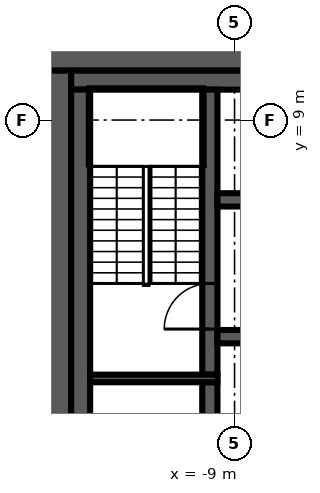
"""IFC4 building model, lengths in metres.
Left out: names, types, materials, properties, quantities, classifications, styles, units other than length and angle.
Written with IfcOpenShell. Run it as: python <this file> out.ifc"""

import sys

from ifc_helpers import new_model, si_unit, direction, frame, frame_2d, origin, place, context, subcontext, project, spatial, rectangle, extrude, element, fill, save


model = new_model("IFC4")
c1 = context("Model", 3, precision=1e-05, world=origin(), true_north=direction((0.0, 1.0)))
c2 = subcontext(c1, "Body", "Model", "MODEL_VIEW")
j1 = project(units=[si_unit("LENGTHUNIT", "METRE"), si_unit("PLANEANGLEUNIT", "RADIAN")], contexts=[c1])
p1 = place(None, origin())
s1 = spatial("IfcSite", under=j1, at=p1, CompositionType="ELEMENT")
p2 = place(p1, origin())
s2 = spatial("IfcBuilding", under=s1, at=p2, CompositionType="ELEMENT")
p3 = place(p2, frame((0.0, 0.0, 279.0)))
s3 = spatial("IfcBuildingStorey", under=s2, at=p3, CompositionType="ELEMENT", Elevation=279.0)
p4 = place(p3, frame((-14.0, 10.65, 0.0), z_axis=(0.0, 0.0, 1.0), x_axis=(1.0, 0.0, 0.0)))
e1 = element("IfcWall", 1, at=p4, inside=s3, PredefinedType="SHEAR", context=c2, shape_type="SweptSolid", body=[
    extrude(rectangle(XDim=28.0, YDim=0.7, at=frame_2d((14.0, 0.0))), origin(), (0.0, 0.0, 1.0), 3.6),
])
p5 = place(p4, frame((15.9, 0.0, 0.0)))
e2 = element("IfcOpeningElement", 2, at=p5, cuts=e1, PredefinedType="OPENING", context=c2, shape_type="SweptSolid", body=[
    extrude(rectangle(XDim=1.6, YDim=2.1, at=frame_2d((0.8, 1.05))), frame((0.0, 0.36, 0.0), z_axis=(0.0, -1.0, 0.0), x_axis=(1.0, 0.0, 0.0)), (0.0, 0.0, 1.0), 0.72),
])
p6 = place(p3, frame((-13.65, -10.3, 0.0), z_axis=(0.0, 0.0, 1.0), x_axis=(0.0, 1.0, 0.0)))
e3 = element("IfcWall", 3, at=p6, inside=s3, PredefinedType="SHEAR", context=c2, shape_type="SweptSolid", body=[
    extrude(rectangle(XDim=20.6, YDim=0.7, at=frame_2d((10.3, 0.0))), origin(), (0.0, 0.0, 1.0), 3.6),
])
p7 = place(p3, frame((-13.3, 10.05, 0.0), z_axis=(0.0, 0.0, 1.0), x_axis=(1.0, 0.0, 0.0)))
e4 = element("IfcWall", 4, at=p7, inside=s3, PredefinedType="SHEAR", context=c2, shape_type="SweptSolid", body=[
    extrude(rectangle(XDim=14.8, YDim=0.5, at=frame_2d((7.4, 0.0))), origin(), (0.0, 0.0, 1.0), 3.6),
])
p8 = place(p3, frame((-13.05, -9.8, 0.0), z_axis=(0.0, 0.0, 1.0), x_axis=(0.0, 1.0, 0.0)))
e5 = element("IfcWall", 5, at=p8, inside=s3, PredefinedType="SHEAR", context=c2, shape_type="SweptSolid", body=[
    extrude(rectangle(XDim=19.6, YDim=0.5, at=frame_2d((9.8, 0.0))), origin(), (0.0, 0.0, 1.0), 3.6),
])
p9 = place(p3, frame((-9.65, -2.1, 0.0), z_axis=(0.0, 0.0, 1.0), x_axis=(0.0, 1.0, 0.0)))
e6 = element("IfcWall", 6, at=p9, inside=s3, PredefinedType="SHEAR", context=c2, shape_type="SweptSolid", body=[
    extrude(rectangle(XDim=4.2, YDim=0.4, at=frame_2d((2.1, 0.0))), origin(), (0.0, 0.0, 1.0), 3.6),
])
p10 = place(p3, frame((-9.65, 2.3, 0.0), z_axis=(0.0, 0.0, 1.0), x_axis=(0.0, 1.0, 0.0)))
e7 = element("IfcWall", 7, at=p10, inside=s3, PredefinedType="SHEAR", context=c2, shape_type="SweptSolid", body=[
    extrude(rectangle(XDim=7.5, YDim=0.4, at=frame_2d((3.75, 0.0))), origin(), (0.0, 0.0, 1.0), 3.6),
])
p11 = place(p10, frame((1.2, 0.0, 0.0)))
e8 = element("IfcOpeningElement", 8, at=p11, cuts=e7, PredefinedType="OPENING", context=c2, shape_type="SweptSolid", body=[
    extrude(rectangle(XDim=1.2, YDim=2.1, at=frame_2d((0.6, 1.05))), frame((0.0, 0.21, 0.0), z_axis=(0.0, -1.0, 0.0), x_axis=(1.0, 0.0, 0.0)), (0.0, 0.0, 1.0), 0.42),
])
p12 = place(p3, frame((-9.45, 2.2, 0.0), z_axis=(0.0, 0.0, 1.0), x_axis=(-1.0, 0.0, 0.0)))
e9 = element("IfcWall", 9, at=p12, inside=s3, PredefinedType="SHEAR", context=c2, shape_type="SweptSolid", body=[
    extrude(rectangle(XDim=3.35, YDim=0.2, at=frame_2d((1.675, 0.0))), origin(), (0.0, 0.0, 1.0), 3.6),
])
p13 = place(p3, frame((-9.45, 6.9, 0.0), z_axis=(0.0, 0.0, 1.0), x_axis=(1.0, 0.0, 0.0)))
e10 = element("IfcWall", 10, at=p13, inside=s3, PredefinedType="SHEAR", context=c2, shape_type="SweptSolid", body=[
    extrude(rectangle(XDim=18.9, YDim=0.35, at=frame_2d((9.45, 0.0))), origin(), (0.0, 0.0, 1.0), 3.6),
])
p14 = place(p13, frame((11.55, 0.0, 0.0)))
e11 = element("IfcOpeningElement", 11, at=p14, cuts=e10, PredefinedType="OPENING", context=c2, shape_type="SweptSolid", body=[
    extrude(rectangle(XDim=1.2, YDim=2.1, at=frame_2d((0.6, 1.05))), frame((0.0, 0.185, 0.0), z_axis=(0.0, -1.0, 0.0), x_axis=(1.0, 0.0, 0.0)), (0.0, 0.0, 1.0), 0.37),
])
p15 = place(p13, frame((14.3, 0.0, 0.0)))
e12 = element("IfcOpeningElement", 12, at=p15, cuts=e10, PredefinedType="OPENING", context=c2, shape_type="SweptSolid", body=[
    extrude(rectangle(XDim=1.1, YDim=2.1, at=frame_2d((0.55, 1.05))), frame((0.0, 0.185, 0.0), z_axis=(0.0, -1.0, 0.0), x_axis=(1.0, 0.0, 0.0)), (0.0, 0.0, 1.0), 0.37),
])
p16 = place(p13, frame((17.0, 0.0, 0.0)))
e13 = element("IfcOpeningElement", 13, at=p16, cuts=e10, PredefinedType="OPENING", context=c2, shape_type="SweptSolid", body=[
    extrude(rectangle(XDim=1.1, YDim=2.1, at=frame_2d((0.55, 1.05))), frame((0.0, 0.185, 0.0), z_axis=(0.0, -1.0, 0.0), x_axis=(1.0, 0.0, 0.0)), (0.0, 0.0, 1.0), 0.37),
])
p17 = place(p13, frame((0.9, 0.0, 0.0)))
e14 = element("IfcOpeningElement", 14, at=p17, cuts=e10, PredefinedType="OPENING", context=c2, shape_type="SweptSolid", body=[
    extrude(rectangle(XDim=0.9, YDim=2.1, at=frame_2d((0.45, 1.05))), frame((0.0, 0.185, 0.0), z_axis=(0.0, -1.0, 0.0), x_axis=(1.0, 0.0, 0.0)), (0.0, 0.0, 1.0), 0.37),
])
p18 = place(p13, frame((4.95, 0.0, 0.0)))
e15 = element("IfcOpeningElement", 15, at=p18, cuts=e10, PredefinedType="OPENING", context=c2, shape_type="SweptSolid", body=[
    extrude(rectangle(XDim=0.9, YDim=2.1, at=frame_2d((0.45, 1.05))), frame((0.0, 0.185, 0.0), z_axis=(0.0, -1.0, 0.0), x_axis=(1.0, 0.0, 0.0)), (0.0, 0.0, 1.0), 0.37),
])
p19 = place(p13, frame((9.0, 0.0, 0.0)))
e16 = element("IfcOpeningElement", 16, at=p19, cuts=e10, PredefinedType="OPENING", context=c2, shape_type="SweptSolid", body=[
    extrude(rectangle(XDim=0.9, YDim=2.1, at=frame_2d((0.45, 1.05))), frame((0.0, 0.185, 0.0), z_axis=(0.0, -1.0, 0.0), x_axis=(1.0, 0.0, 0.0)), (0.0, 0.0, 1.0), 0.37),
])
p20 = place(p3, frame((9.45, 3.3, 0.0), z_axis=(0.0, 0.0, 1.0), x_axis=(-1.0, 0.0, 0.0)))
e17 = element("IfcWall", 17, at=p20, inside=s3, PredefinedType="SHEAR", context=c2, shape_type="SweptSolid", body=[
    extrude(rectangle(XDim=18.9, YDim=0.35, at=frame_2d((9.45, 0.0))), origin(), (0.0, 0.0, 1.0), 3.6),
])
p21 = place(p20, frame((6.2, 0.0, 0.0)))
e18 = element("IfcOpeningElement", 18, at=p21, cuts=e17, PredefinedType="OPENING", context=c2, shape_type="SweptSolid", body=[
    extrude(rectangle(XDim=1.1, YDim=2.1, at=frame_2d((0.55, 1.05))), frame((0.0, 0.185, 0.0), z_axis=(0.0, -1.0, 0.0), x_axis=(1.0, 0.0, 0.0)), (0.0, 0.0, 1.0), 0.37),
])
p22 = place(p20, frame((3.5, 0.0, 0.0)))
e19 = element("IfcOpeningElement", 19, at=p22, cuts=e17, PredefinedType="OPENING", context=c2, shape_type="SweptSolid", body=[
    extrude(rectangle(XDim=1.1, YDim=2.1, at=frame_2d((0.55, 1.05))), frame((0.0, 0.185, 0.0), z_axis=(0.0, -1.0, 0.0), x_axis=(1.0, 0.0, 0.0)), (0.0, 0.0, 1.0), 0.37),
])
p23 = place(p20, frame((0.9, 0.0, 0.0)))
e20 = element("IfcOpeningElement", 20, at=p23, cuts=e17, PredefinedType="OPENING", context=c2, shape_type="SweptSolid", body=[
    extrude(rectangle(XDim=0.9, YDim=2.1, at=frame_2d((0.45, 1.05))), frame((0.0, 0.185, 0.0), z_axis=(0.0, -1.0, 0.0), x_axis=(1.0, 0.0, 0.0)), (0.0, 0.0, 1.0), 0.37),
])
p24 = place(p20, frame((15.75, 0.0, 0.0)))
e21 = element("IfcOpeningElement", 21, at=p24, cuts=e17, PredefinedType="OPENING", context=c2, shape_type="SweptSolid", body=[
    extrude(rectangle(XDim=0.9, YDim=2.1, at=frame_2d((0.45, 1.05))), frame((0.0, 0.185, 0.0), z_axis=(0.0, -1.0, 0.0), x_axis=(1.0, 0.0, 0.0)), (0.0, 0.0, 1.0), 0.37),
])
p25 = place(p20, frame((11.7, 0.0, 0.0)))
e22 = element("IfcOpeningElement", 22, at=p25, cuts=e17, PredefinedType="OPENING", context=c2, shape_type="SweptSolid", body=[
    extrude(rectangle(XDim=0.9, YDim=2.1, at=frame_2d((0.45, 1.05))), frame((0.0, 0.185, 0.0), z_axis=(0.0, -1.0, 0.0), x_axis=(1.0, 0.0, 0.0)), (0.0, 0.0, 1.0), 0.37),
])
p26 = place(p20, frame((9.0, 0.0, 0.0)))
e23 = element("IfcOpeningElement", 23, at=p26, cuts=e17, PredefinedType="OPENING", context=c2, shape_type="SweptSolid", body=[
    extrude(rectangle(XDim=0.9, YDim=2.1, at=frame_2d((0.45, 1.05))), frame((0.0, 0.185, 0.0), z_axis=(0.0, -1.0, 0.0), x_axis=(1.0, 0.0, 0.0)), (0.0, 0.0, 1.0), 0.37),
])
p27 = place(p11, origin())
e24 = element("IfcDoor", 24, at=p27, inside=s3, OperationType="SINGLE_SWING_RIGHT", PredefinedType="DOOR", context=c2, shape_type="SweptSolid", body=[
    extrude(rectangle(XDim=1.2, YDim=2.1, at=frame_2d((0.6, 1.05))), frame((0.0, 0.025, 0.0), z_axis=(0.0, -1.0, 0.0), x_axis=(1.0, 0.0, 0.0)), (0.0, 0.0, 1.0), 0.05),
])
fill(e8, e24)
save(model, sys.argv[1])
